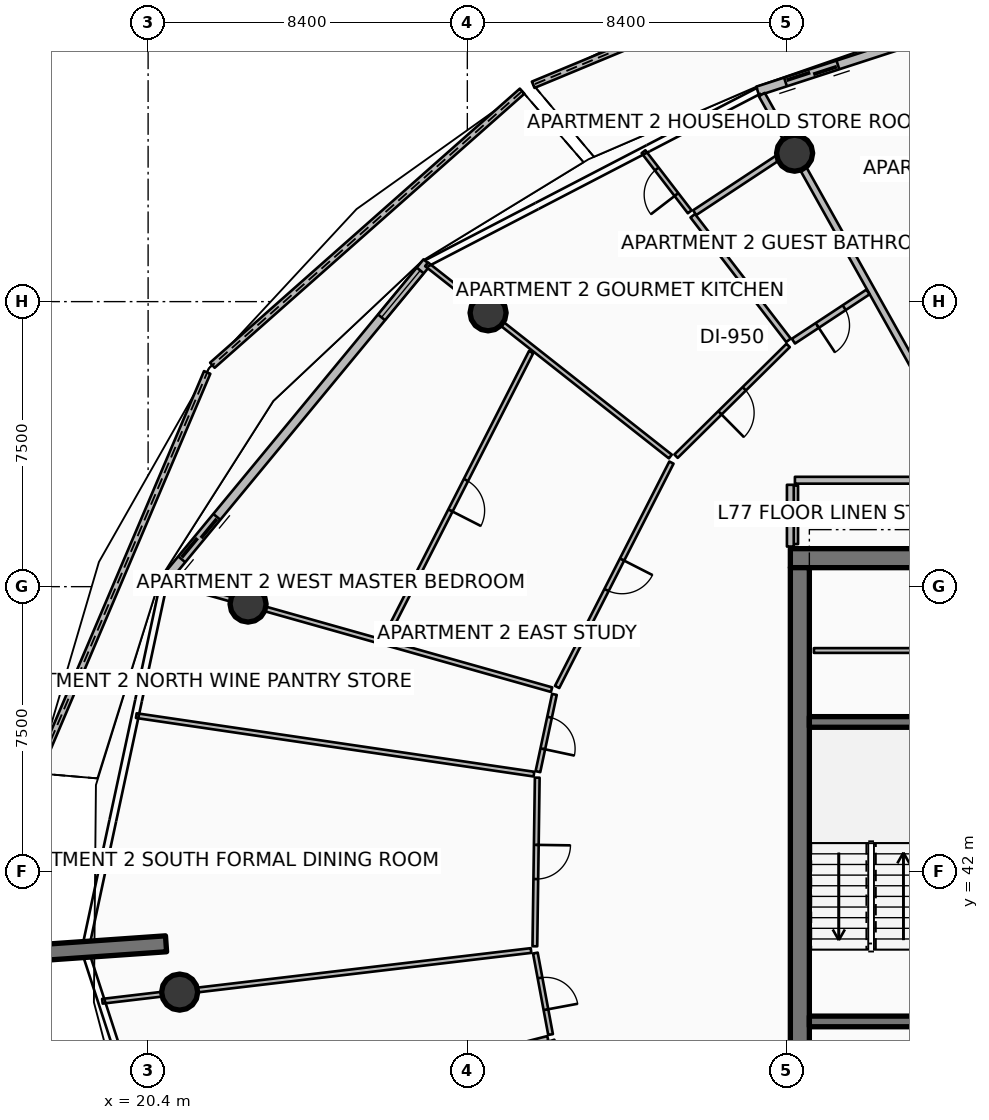
"""IFC4 building model, lengths in metres.
Left out: names, types, materials, properties, quantities, classifications, styles, units other than length and angle.
Written with IfcOpenShell. Run it as: python <this file> out.ifc"""

import sys

from ifc_helpers import new_model, si_unit, direction, frame, frame_2d, origin, origin_2d, place, context, subcontext, project, spatial, polyline, rectangle, circle, outline, extrude, element, fill, save


model = new_model("IFC4")
c1 = context("Model", 3, precision=1e-05, world=origin(), true_north=direction((0.0, 1.0)))
c2 = subcontext(c1, "Body", "Model", "MODEL_VIEW")
j1 = project(units=[si_unit("LENGTHUNIT", "METRE"), si_unit("PLANEANGLEUNIT", "RADIAN")], contexts=[c1])
p1 = place(None, origin())
s1 = spatial("IfcSite", under=j1, at=p1, CompositionType="ELEMENT")
p2 = place(p1, origin())
s2 = spatial("IfcBuilding", under=s1, at=p2, CompositionType="ELEMENT")
p3 = place(p2, frame((0.0, 0.0, 306.0)))
s3 = spatial("IfcBuildingStorey", under=s2, at=p3, CompositionType="ELEMENT", Elevation=306.0)
p4 = place(p3, frame((37.3, 50.25, 0.0), z_axis=(0.0, 0.0, 1.0), x_axis=(1.0, 0.0, 0.0)))
e1 = element("IfcWall", 1, at=p4, inside=s3, PredefinedType="SHEAR", context=c2, shape_type="SweptSolid", body=[
    extrude(rectangle(XDim=9.6, YDim=0.5, at=frame_2d((4.8, 0.0))), origin(), (0.0, 0.0, 1.0), 3.85),
])
p5 = place(p3, frame((37.55, 34.0, 0.0), z_axis=(0.0, 0.0, 1.0), x_axis=(0.0, 1.0, 0.0)))
e2 = element("IfcWall", 2, at=p5, inside=s3, PredefinedType="SHEAR", context=c2, shape_type="SweptSolid", body=[
    extrude(rectangle(XDim=16.0, YDim=0.5, at=frame_2d((8.0, 0.0))), origin(), (0.0, 0.0, 1.0), 3.85),
])
for number, where, z_axis, x_axis in (
    (3, (37.8, 38.06, 0.0), (0.0, 0.0, 1.0), (1.0, 0.0, 0.0)),
    (4, (37.8, 45.94, 0.0), (0.0, 0.0, 1.0), (1.0, 0.0, 0.0)),
):
    element("IfcWall", number, at=place(p3, frame(where, z_axis=z_axis, x_axis=x_axis)), inside=s3, PredefinedType="SHEAR", context=c2, shape_type="SweptSolid", body=[
        extrude(rectangle(XDim=3.5, YDim=0.28, at=frame_2d((1.75, 0.0))), origin(), (0.0, 0.0, 1.0), 3.85),
    ])
p6 = place(p3, frame((20.872, 40.103, 0.0), z_axis=(0.0, 0.0, 1.0), x_axis=(-0.997564163539, -0.069754853754, 0.0)))
e5 = element("IfcWall", 5, at=p6, inside=s3, PredefinedType="SOLIDWALL", context=c2, shape_type="SweptSolid", body=[
    extrude(rectangle(XDim=3.5, YDim=0.42, at=frame_2d((1.75, 0.0))), origin(), (0.0, 0.0, 1.0), 3.85),
])
p7 = place(p3, frame((37.412, 60.906, 0.0), z_axis=(0.142922715552, -0.25519013274, 0.956269362435), x_axis=(0.872482342855, 0.488645639913, 0.0)))
e6 = element("IfcColumn", 6, at=p7, inside=s3, PredefinedType="COLUMN", context=c2, shape_type="SweptSolid", body=[
    extrude(circle(Radius=0.475, at=origin_2d()), origin(), (0.0, 0.0, 1.0), 3.608),
])
p8 = place(p3, frame((29.346, 56.705, 0.0), z_axis=(0.249725028878, -0.196787616792, 0.948109721408), x_axis=(0.618939298338, 0.785438823189, 0.0)))
e7 = element("IfcColumn", 7, at=p8, inside=s3, PredefinedType="COLUMN", context=c2, shape_type="SweptSolid", body=[
    extrude(circle(Radius=0.475, at=origin_2d()), origin(), (0.0, 0.0, 1.0), 3.639),
])
p9 = place(p3, frame((23.03, 49.042, 0.0), z_axis=(0.330987533093, -0.093362273438, 0.939005185734), x_axis=(0.271478522348, 0.96244449809, 0.0)))
e8 = element("IfcColumn", 8, at=p9, inside=s3, PredefinedType="COLUMN", context=c2, shape_type="SweptSolid", body=[
    extrude(circle(Radius=0.475, at=origin_2d()), origin(), (0.0, 0.0, 1.0), 3.674),
])
p10 = place(p3, frame((21.23, 38.832, 0.0), z_axis=(0.353185583697, 0.041800241366, 0.934619004349), x_axis=(-0.117531776266, 0.993069122251, 0.0)))
e9 = element("IfcColumn", 9, at=p10, inside=s3, PredefinedType="COLUMN", context=c2, shape_type="SweptSolid", body=[
    extrude(circle(Radius=0.475, at=origin_2d()), origin(), (0.0, 0.0, 1.0), 3.691),
])
p11 = place(p3, frame((39.885, 66.589, 0.0), z_axis=(0.0, 0.0, 1.0), x_axis=(-0.923579743218, -0.383406387424, 0.0)))
e10 = element("IfcWall", 10, at=p11, inside=s3, PredefinedType="PARAPET", context=c2, shape_type="SweptSolid", body=[
    extrude(outline(polyline([(0.0, 0.0), (10.126, 0.0), (10.126, 1.756), (5.063, 1.853), (0.0, 1.832), (0.0, 0.0)])), frame((0.0, 0.09, 0.0), z_axis=(0.0, -1.0, 0.0), x_axis=(1.0, 0.0, 0.0)), (0.0, 0.0, 1.0), 0.18),
])
p12 = place(p3, frame((30.241, 62.537, 0.0), z_axis=(0.0, 0.0, 1.0), x_axis=(-0.748953310354, -0.662622772707, 0.0)))
e11 = element("IfcWall", 11, at=p12, inside=s3, PredefinedType="PARAPET", context=c2, shape_type="SweptSolid", body=[
    extrude(outline(polyline([(0.0, 0.0), (10.882, 0.0), (10.882, 1.348), (5.441, 1.562), (0.0, 1.747), (0.0, 0.0)])), frame((0.0, 0.09, 0.0), z_axis=(0.0, -1.0, 0.0), x_axis=(1.0, 0.0, 0.0)), (0.0, 0.0, 1.0), 0.18),
])
p13 = place(p3, frame((21.954, 55.137, 0.0), z_axis=(0.0, 0.0, 1.0), x_axis=(-0.391228155608, -0.920293719559, 0.0)))
e12 = element("IfcWall", 12, at=p13, inside=s3, PredefinedType="PARAPET", context=c2, shape_type="SweptSolid", body=[
    extrude(outline(polyline([(0.0, 0.0), (11.46, 0.0), (11.46, 1.12), (5.73, 1.182), (0.0, 1.348), (0.0, 0.0)])), frame((0.0, 0.09, 0.0), z_axis=(0.0, -1.0, 0.0), x_axis=(1.0, 0.0, 0.0)), (0.0, 0.0, 1.0), 0.18),
])
p14 = place(p3, frame((45.278, 65.414, 0.0), z_axis=(0.0, 0.0, 1.0), x_axis=(-0.951057039462, -0.309015384228, 0.0)))
e13 = element("IfcWall", 13, at=p14, inside=s3, PredefinedType="SOLIDWALL", context=c2, shape_type="SweptSolid", body=[
    extrude(rectangle(XDim=9.293, YDim=0.24, at=frame_2d((4.647, 0.0))), origin(), (0.0, 0.0, 1.0), 2.4),
])
p15 = place(p14, frame((7.073, 0.0, 0.0)))
e14 = element("IfcOpeningElement", 14, at=p15, cuts=e13, PredefinedType="OPENING", context=c2, shape_type="SweptSolid", body=[
    extrude(rectangle(XDim=1.45, YDim=2.15, at=frame_2d((0.725, 1.075))), frame((0.0, 0.13, 0.0), z_axis=(0.0, -1.0, 0.0), x_axis=(1.0, 0.0, 0.0)), (0.0, 0.0, 1.0), 0.26),
])
p16 = place(p14, frame((0.28, 0.0, 0.65)))
e15 = element("IfcOpeningElement", 15, at=p16, cuts=e13, PredefinedType="OPENING", context=c2, shape_type="SweptSolid", body=[
    extrude(rectangle(XDim=1.6, YDim=1.5, at=frame_2d((0.8, 0.75))), frame((0.0, 0.13, 0.0), z_axis=(0.0, -1.0, 0.0), x_axis=(1.0, 0.0, 0.0)), (0.0, 0.0, 1.0), 0.26),
])
p17 = place(p3, frame((27.74, 58.036, 0.0), z_axis=(0.0, 0.0, 1.0), x_axis=(-0.636725835274, -0.771090274024, 0.0)))
e16 = element("IfcWall", 16, at=p17, inside=s3, PredefinedType="SOLIDWALL", context=c2, shape_type="SweptSolid", body=[
    extrude(rectangle(XDim=10.907, YDim=0.24, at=frame_2d((5.454, 0.0))), origin(), (0.0, 0.0, 1.0), 2.4),
])
p18 = place(p17, frame((8.687, 0.0, 0.0)))
e17 = element("IfcOpeningElement", 17, at=p18, cuts=e16, PredefinedType="OPENING", context=c2, shape_type="SweptSolid", body=[
    extrude(rectangle(XDim=1.45, YDim=2.15, at=frame_2d((0.725, 1.075))), frame((0.0, 0.13, 0.0), z_axis=(0.0, -1.0, 0.0), x_axis=(1.0, 0.0, 0.0)), (0.0, 0.0, 1.0), 0.26),
])
p19 = place(p17, frame((0.28, 0.0, 0.65)))
e18 = element("IfcOpeningElement", 18, at=p19, cuts=e16, PredefinedType="OPENING", context=c2, shape_type="SweptSolid", body=[
    extrude(rectangle(XDim=1.6, YDim=1.5, at=frame_2d((0.8, 0.75))), frame((0.0, 0.13, 0.0), z_axis=(0.0, -1.0, 0.0), x_axis=(1.0, 0.0, 0.0)), (0.0, 0.0, 1.0), 0.26),
])
p20 = place(p3, frame((37.92, 47.82, 0.0), z_axis=(0.0, 0.0, 1.0), x_axis=(1.0, 0.0, 0.0)))
e19 = element("IfcWall", 19, at=p20, inside=s3, PredefinedType="PARTITIONING", context=c2, shape_type="SweptSolid", body=[
    extrude(rectangle(XDim=8.78, YDim=0.125, at=frame_2d((4.39, 0.0))), origin(), (0.0, 0.0, 1.0), 2.89),
])
p21 = place(p20, frame((3.965, 0.0, 0.0)))
e20 = element("IfcOpeningElement", 20, at=p21, cuts=e19, PredefinedType="OPENING", context=c2, shape_type="SweptSolid", body=[
    extrude(rectangle(XDim=0.85, YDim=2.06, at=frame_2d((0.425, 1.03))), frame((0.0, 0.073, 0.0), z_axis=(0.0, -1.0, 0.0), x_axis=(1.0, 0.0, 0.0)), (0.0, 0.0, 1.0), 0.145),
])
p22 = place(p3, frame((37.44, 50.62, 0.0), z_axis=(0.0, 0.0, 1.0), x_axis=(0.0, 1.0, 0.0)))
e21 = element("IfcWall", 21, at=p22, inside=s3, PredefinedType="PARTITIONING", context=c2, shape_type="SweptSolid", body=[
    extrude(rectangle(XDim=1.54, YDim=0.125, at=frame_2d((0.77, 0.0))), origin(), (0.0, 0.0, 1.0), 2.407),
])
p23 = place(p3, frame((42.178, 52.396, 0.0), z_axis=(0.0, 0.0, 1.0), x_axis=(-0.488621436647, 0.872495897783, 0.0)))
e22 = element("IfcWall", 22, at=p23, inside=s3, PredefinedType="PARTITIONING", context=c2, shape_type="SweptSolid", body=[
    extrude(rectangle(XDim=11.521, YDim=0.18, at=frame_2d((5.76, 0.0))), origin(), (0.0, 0.0, 1.0), 2.407),
])
p24 = place(p3, frame((42.112, 52.3, 0.0), z_axis=(0.0, 0.0, 1.0), x_axis=(-1.0, 0.0, 0.0)))
e23 = element("IfcWall", 23, at=p24, inside=s3, PredefinedType="PARTITIONING", context=c2, shape_type="SweptSolid", body=[
    extrude(rectangle(XDim=4.692, YDim=0.18, at=frame_2d((2.346, 0.0))), origin(), (0.0, 0.0, 1.0), 2.407),
])
p25 = place(p3, frame((37.3, 52.18, 0.0), z_axis=(0.0, 0.0, 1.0), x_axis=(0.0, -1.0, 0.0)))
e24 = element("IfcWall", 24, at=p25, inside=s3, PredefinedType="PARTITIONING", context=c2, shape_type="SweptSolid", body=[
    extrude(rectangle(XDim=1.625, YDim=0.18, at=frame_2d((0.812, 0.0))), origin(), (0.0, 0.0, 1.0), 2.407),
])
p26 = place(p3, frame((39.343, 57.254, 0.0), z_axis=(0.0, 0.0, 1.0), x_axis=(-0.834820417885, -0.550522360929, 0.0)))
e25 = element("IfcWall", 25, at=p26, inside=s3, PredefinedType="PARTITIONING", context=c2, shape_type="SweptSolid", body=[
    extrude(rectangle(XDim=2.35, YDim=0.15, at=frame_2d((1.175, 0.0))), origin(), (0.0, 0.0, 1.0), 2.407),
])
p27 = place(p26, frame((0.75, 0.0, 0.0)))
e26 = element("IfcOpeningElement", 26, at=p27, cuts=e25, PredefinedType="OPENING", context=c2, shape_type="SweptSolid", body=[
    extrude(rectangle(XDim=0.85, YDim=2.06, at=frame_2d((0.425, 1.03))), frame((0.0, 0.085, 0.0), z_axis=(0.0, -1.0, 0.0), x_axis=(1.0, 0.0, 0.0)), (0.0, 0.0, 1.0), 0.17),
])
p28 = place(p3, frame((37.26, 60.974, 0.0), z_axis=(0.0, 0.0, 1.0), x_axis=(-0.834824162433, -0.550516682598, 0.0)))
e27 = element("IfcWall", 27, at=p28, inside=s3, PredefinedType="PARTITIONING", context=c2, shape_type="SweptSolid", body=[
    extrude(rectangle(XDim=2.968, YDim=0.15, at=frame_2d((1.484, 0.0))), origin(), (0.0, 0.0, 1.0), 2.89),
])
p29 = place(p3, frame((37.251, 55.982, 0.0), z_axis=(0.0, 0.0, 1.0), x_axis=(-0.609453869873, 0.792821531303, 0.0)))
e28 = element("IfcWall", 28, at=p29, inside=s3, PredefinedType="PARTITIONING", context=c2, shape_type="SweptSolid", body=[
    extrude(rectangle(XDim=4.134, YDim=0.15, at=frame_2d((2.067, 0.0))), origin(), (0.0, 0.0, 1.0), 2.425),
])
p30 = place(p3, frame((34.652, 59.362, 0.0), z_axis=(0.0, 0.0, 1.0), x_axis=(-0.609450605146, 0.792824040937, 0.0)))
e29 = element("IfcWall", 29, at=p30, inside=s3, PredefinedType="PARTITIONING", context=c2, shape_type="SweptSolid", body=[
    extrude(rectangle(XDim=1.996, YDim=0.125, at=frame_2d((0.998, 0.0))), origin(), (0.0, 0.0, 1.0), 2.89),
])
p31 = place(p30, frame((0.573, 0.0, 0.0)))
e30 = element("IfcOpeningElement", 30, at=p31, cuts=e29, PredefinedType="OPENING", context=c2, shape_type="SweptSolid", body=[
    extrude(rectangle(XDim=0.85, YDim=2.06, at=frame_2d((0.425, 1.03))), frame((0.0, 0.073, 0.0), z_axis=(0.0, -1.0, 0.0), x_axis=(1.0, 0.0, 0.0)), (0.0, 0.0, 1.0), 0.145),
])
p32 = place(p3, frame((37.242, 55.847, 0.0), z_axis=(0.0, 0.0, 1.0), x_axis=(-0.711391624602, -0.702795814192, 0.0)))
e31 = element("IfcWall", 31, at=p32, inside=s3, PredefinedType="PARTITIONING", context=c2, shape_type="SweptSolid", body=[
    extrude(rectangle(XDim=4.147, YDim=0.125, at=frame_2d((2.073, 0.0))), origin(), (0.0, 0.0, 1.0), 2.407),
])
p33 = place(p32, frame((1.623, 0.0, 0.0)))
e32 = element("IfcOpeningElement", 32, at=p33, cuts=e31, PredefinedType="OPENING", context=c2, shape_type="SweptSolid", body=[
    extrude(rectangle(XDim=0.9, YDim=2.08, at=frame_2d((0.45, 1.04))), frame((0.0, 0.073, 0.0), z_axis=(0.0, -1.0, 0.0), x_axis=(1.0, 0.0, 0.0)), (0.0, 0.0, 1.0), 0.145),
])
p34 = place(p3, frame((34.142, 52.925, 0.0), z_axis=(0.0, 0.0, 1.0), x_axis=(-0.785321699218, 0.619087900655, 0.0)))
e33 = element("IfcWall", 33, at=p34, inside=s3, PredefinedType="PARTITIONING", context=c2, shape_type="SweptSolid", body=[
    extrude(rectangle(XDim=8.169, YDim=0.125, at=frame_2d((4.084, 0.0))), origin(), (0.0, 0.0, 1.0), 2.407),
])
p35 = place(p3, frame((34.171, 52.765, 0.0), z_axis=(0.0, 0.0, 1.0), x_axis=(-0.453994771894, -0.891004347404, 0.0)))
e34 = element("IfcWall", 34, at=p35, inside=s3, PredefinedType="PARTITIONING", context=c2, shape_type="SweptSolid", body=[
    extrude(rectangle(XDim=6.626, YDim=0.125, at=frame_2d((3.313, 0.0))), origin(), (0.0, 0.0, 1.0), 2.407),
])
p36 = place(p35, frame((2.863, 0.0, 0.0)))
e35 = element("IfcOpeningElement", 35, at=p36, cuts=e34, PredefinedType="OPENING", context=c2, shape_type="SweptSolid", body=[
    extrude(rectangle(XDim=0.9, YDim=2.08, at=frame_2d((0.45, 1.04))), frame((0.0, 0.073, 0.0), z_axis=(0.0, -1.0, 0.0), x_axis=(1.0, 0.0, 0.0)), (0.0, 0.0, 1.0), 0.145),
])
p37 = place(p3, frame((30.48, 55.674, 0.0), z_axis=(0.0, 0.0, 1.0), x_axis=(-0.453999703912, -0.891001834368, 0.0)))
e36 = element("IfcWall", 36, at=p37, inside=s3, PredefinedType="PARTITIONING", context=c2, shape_type="SweptSolid", body=[
    extrude(rectangle(XDim=8.46, YDim=0.125, at=frame_2d((4.23, 0.0))), origin(), (0.0, 0.0, 1.0), 2.407),
])
p38 = place(p37, frame((3.78, 0.0, 0.0)))
e37 = element("IfcOpeningElement", 37, at=p38, cuts=e36, PredefinedType="OPENING", context=c2, shape_type="SweptSolid", body=[
    extrude(rectangle(XDim=0.9, YDim=2.08, at=frame_2d((0.45, 1.04))), frame((0.0, 0.073, 0.0), z_axis=(0.0, -1.0, 0.0), x_axis=(1.0, 0.0, 0.0)), (0.0, 0.0, 1.0), 0.145),
])
p39 = place(p3, frame((31.017, 46.79, 0.0), z_axis=(0.0, 0.0, 1.0), x_axis=(-0.962454365365, 0.271443538495, 0.0)))
e38 = element("IfcWall", 38, at=p39, inside=s3, PredefinedType="PARTITIONING", context=c2, shape_type="SweptSolid", body=[
    extrude(rectangle(XDim=10.463, YDim=0.125, at=frame_2d((5.231, 0.0))), origin(), (0.0, 0.0, 1.0), 2.407),
])
p40 = place(p3, frame((30.552, 44.567, 0.0), z_axis=(0.0, 0.0, 1.0), x_axis=(-0.989347012597, 0.145576401471, 0.0)))
e39 = element("IfcWall", 39, at=p40, inside=s3, PredefinedType="PARTITIONING", context=c2, shape_type="SweptSolid", body=[
    extrude(rectangle(XDim=10.575, YDim=0.125, at=frame_2d((5.288, 0.0))), origin(), (0.0, 0.0, 1.0), 2.425),
])
p41 = place(p3, frame((31.092, 46.665, 0.0), z_axis=(0.0, 0.0, 1.0), x_axis=(-0.208863180958, -0.977944871473, 0.0)))
e40 = element("IfcWall", 40, at=p41, inside=s3, PredefinedType="PARTITIONING", context=c2, shape_type="SweptSolid", body=[
    extrude(rectangle(XDim=2.078, YDim=0.125, at=frame_2d((1.039, 0.0))), origin(), (0.0, 0.0, 1.0), 2.407),
])
p42 = place(p41, frame((0.614, 0.0, 0.0)))
e41 = element("IfcOpeningElement", 41, at=p42, cuts=e40, PredefinedType="OPENING", context=c2, shape_type="SweptSolid", body=[
    extrude(rectangle(XDim=0.85, YDim=2.06, at=frame_2d((0.425, 1.03))), frame((0.0, 0.073, 0.0), z_axis=(0.0, -1.0, 0.0), x_axis=(1.0, 0.0, 0.0)), (0.0, 0.0, 1.0), 0.145),
])
p43 = place(p3, frame((30.64, 44.474, 0.0), z_axis=(0.0, 0.0, 1.0), x_axis=(-0.014196236018, -0.999899228364, 0.0)))
e42 = element("IfcWall", 42, at=p43, inside=s3, PredefinedType="PARTITIONING", context=c2, shape_type="SweptSolid", body=[
    extrude(rectangle(XDim=4.437, YDim=0.125, at=frame_2d((2.219, 0.0))), origin(), (0.0, 0.0, 1.0), 2.407),
])
p44 = place(p43, frame((1.768, 0.0, 0.0)))
e43 = element("IfcOpeningElement", 43, at=p44, cuts=e42, PredefinedType="OPENING", context=c2, shape_type="SweptSolid", body=[
    extrude(rectangle(XDim=0.9, YDim=2.08, at=frame_2d((0.45, 1.04))), frame((0.0, 0.073, 0.0), z_axis=(0.0, -1.0, 0.0), x_axis=(1.0, 0.0, 0.0)), (0.0, 0.0, 1.0), 0.145),
])
p45 = place(p3, frame((30.476, 39.926, 0.0), z_axis=(0.0, 0.0, 1.0), x_axis=(-0.993068783977, -0.117534634433, 0.0)))
e44 = element("IfcWall", 44, at=p45, inside=s3, PredefinedType="PARTITIONING", context=c2, shape_type="SweptSolid", body=[
    extrude(rectangle(XDim=11.358, YDim=0.125, at=frame_2d((5.679, 0.0))), origin(), (0.0, 0.0, 1.0), 2.407),
])
p46 = place(p3, frame((30.918, 37.614, 0.0), z_axis=(0.0, 0.0, 1.0), x_axis=(-0.968583288046, -0.248689392855, 0.0)))
e45 = element("IfcWall", 45, at=p46, inside=s3, PredefinedType="PARTITIONING", context=c2, shape_type="SweptSolid", body=[
    extrude(rectangle(XDim=10.866, YDim=0.125, at=frame_2d((5.433, 0.0))), origin(), (0.0, 0.0, 1.0), 2.425),
])
p47 = place(p3, frame((30.59, 39.859, 0.0), z_axis=(0.0, 0.0, 1.0), x_axis=(0.183463941639, -0.983026440193, 0.0)))
e46 = element("IfcWall", 46, at=p47, inside=s3, PredefinedType="PARTITIONING", context=c2, shape_type="SweptSolid", body=[
    extrude(rectangle(XDim=2.181, YDim=0.125, at=frame_2d((1.091, 0.0))), origin(), (0.0, 0.0, 1.0), 2.407),
])
p48 = place(p47, frame((0.666, 0.0, 0.0)))
e47 = element("IfcOpeningElement", 47, at=p48, cuts=e46, PredefinedType="OPENING", context=c2, shape_type="SweptSolid", body=[
    extrude(rectangle(XDim=0.85, YDim=2.06, at=frame_2d((0.425, 1.03))), frame((0.0, 0.073, 0.0), z_axis=(0.0, -1.0, 0.0), x_axis=(1.0, 0.0, 0.0)), (0.0, 0.0, 1.0), 0.145),
])
p49 = place(p3, frame((31.03, 37.56, 0.0), z_axis=(0.0, 0.0, 1.0), x_axis=(0.309086072338, -0.951034068731, 0.0)))
e48 = element("IfcWall", 48, at=p49, inside=s3, PredefinedType="PARTITIONING", context=c2, shape_type="SweptSolid", body=[
    extrude(rectangle(XDim=2.043, YDim=0.125, at=frame_2d((1.022, 0.0))), origin(), (0.0, 0.0, 1.0), 2.89),
])
p50 = place(p49, frame((0.597, 0.0, 0.0)))
e49 = element("IfcOpeningElement", 49, at=p50, cuts=e48, PredefinedType="OPENING", context=c2, shape_type="SweptSolid", body=[
    extrude(rectangle(XDim=0.85, YDim=2.06, at=frame_2d((0.425, 1.03))), frame((0.0, 0.073, 0.0), z_axis=(0.0, -1.0, 0.0), x_axis=(1.0, 0.0, 0.0)), (0.0, 0.0, 1.0), 0.145),
])
p51 = place(p15, origin())
e50 = element("IfcDoor", 50, at=p51, inside=s3, OperationType="DOUBLE_DOOR_SLIDING", PredefinedType="DOOR", context=c2, shape_type="SweptSolid", body=[
    extrude(rectangle(XDim=1.45, YDim=2.15, at=frame_2d((0.725, 1.075))), frame((0.0, 0.025, 0.0), z_axis=(0.0, -1.0, 0.0), x_axis=(1.0, 0.0, 0.0)), (0.0, 0.0, 1.0), 0.05),
])
fill(e14, e50)
p52 = place(p18, origin())
e51 = element("IfcDoor", 51, at=p52, inside=s3, OperationType="DOUBLE_DOOR_SLIDING", PredefinedType="DOOR", context=c2, shape_type="SweptSolid", body=[
    extrude(rectangle(XDim=1.45, YDim=2.15, at=frame_2d((0.725, 1.075))), frame((0.0, 0.025, 0.0), z_axis=(0.0, -1.0, 0.0), x_axis=(1.0, 0.0, 0.0)), (0.0, 0.0, 1.0), 0.05),
])
fill(e17, e51)
p53 = place(p19, origin())
e52 = element("IfcWindow", 52, at=p53, inside=s3, PartitioningType="SINGLE_PANEL", PredefinedType="WINDOW", context=c2, shape_type="SweptSolid", body=[
    extrude(rectangle(XDim=1.6, YDim=1.5, at=frame_2d((0.8, 0.75))), frame((0.0, 0.03, 0.0), z_axis=(0.0, -1.0, 0.0), x_axis=(1.0, 0.0, 0.0)), (0.0, 0.0, 1.0), 0.06),
])
fill(e18, e52)
p54 = place(p27, origin())
e53 = element("IfcDoor", 53, at=p54, inside=s3, OperationType="SINGLE_SWING_RIGHT", PredefinedType="DOOR", context=c2, shape_type="SweptSolid", body=[
    extrude(rectangle(XDim=0.85, YDim=2.06, at=frame_2d((0.425, 1.03))), frame((0.0, 0.025, 0.0), z_axis=(0.0, -1.0, 0.0), x_axis=(1.0, 0.0, 0.0)), (0.0, 0.0, 1.0), 0.05),
])
fill(e26, e53)
p55 = place(p31, origin())
e54 = element("IfcDoor", 54, at=p55, inside=s3, OperationType="SINGLE_SWING_LEFT", PredefinedType="DOOR", context=c2, shape_type="SweptSolid", body=[
    extrude(rectangle(XDim=0.85, YDim=2.06, at=frame_2d((0.425, 1.03))), frame((0.0, 0.025, 0.0), z_axis=(0.0, -1.0, 0.0), x_axis=(1.0, 0.0, 0.0)), (0.0, 0.0, 1.0), 0.05),
])
fill(e30, e54)
p56 = place(p33, origin())
e55 = element("IfcDoor", 55, at=p56, inside=s3, OperationType="SINGLE_SWING_RIGHT", PredefinedType="DOOR", context=c2, shape_type="SweptSolid", body=[
    extrude(rectangle(XDim=0.9, YDim=2.08, at=frame_2d((0.45, 1.04))), frame((0.0, 0.025, 0.0), z_axis=(0.0, -1.0, 0.0), x_axis=(1.0, 0.0, 0.0)), (0.0, 0.0, 1.0), 0.05),
])
fill(e32, e55)
p57 = place(p36, origin())
e56 = element("IfcDoor", 56, at=p57, inside=s3, OperationType="SINGLE_SWING_LEFT", PredefinedType="DOOR", context=c2, shape_type="SweptSolid", body=[
    extrude(rectangle(XDim=0.9, YDim=2.08, at=frame_2d((0.45, 1.04))), frame((0.0, 0.025, 0.0), z_axis=(0.0, -1.0, 0.0), x_axis=(1.0, 0.0, 0.0)), (0.0, 0.0, 1.0), 0.05),
])
fill(e35, e56)
p58 = place(p38, origin())
e57 = element("IfcDoor", 57, at=p58, inside=s3, OperationType="SINGLE_SWING_RIGHT", PredefinedType="DOOR", context=c2, shape_type="SweptSolid", body=[
    extrude(rectangle(XDim=0.9, YDim=2.08, at=frame_2d((0.45, 1.04))), frame((0.0, 0.025, 0.0), z_axis=(0.0, -1.0, 0.0), x_axis=(1.0, 0.0, 0.0)), (0.0, 0.0, 1.0), 0.05),
])
fill(e37, e57)
p59 = place(p42, origin())
e58 = element("IfcDoor", 58, at=p59, inside=s3, OperationType="SINGLE_SWING_RIGHT", PredefinedType="DOOR", context=c2, shape_type="SweptSolid", body=[
    extrude(rectangle(XDim=0.85, YDim=2.06, at=frame_2d((0.425, 1.03))), frame((0.0, 0.025, 0.0), z_axis=(0.0, -1.0, 0.0), x_axis=(1.0, 0.0, 0.0)), (0.0, 0.0, 1.0), 0.05),
])
fill(e41, e58)
p60 = place(p44, origin())
e59 = element("IfcDoor", 59, at=p60, inside=s3, OperationType="SINGLE_SWING_LEFT", PredefinedType="DOOR", context=c2, shape_type="SweptSolid", body=[
    extrude(rectangle(XDim=0.9, YDim=2.08, at=frame_2d((0.45, 1.04))), frame((0.0, 0.025, 0.0), z_axis=(0.0, -1.0, 0.0), x_axis=(1.0, 0.0, 0.0)), (0.0, 0.0, 1.0), 0.05),
])
fill(e43, e59)
p61 = place(p48, origin())
e60 = element("IfcDoor", 60, at=p61, inside=s3, OperationType="SINGLE_SWING_RIGHT", PredefinedType="DOOR", context=c2, shape_type="SweptSolid", body=[
    extrude(rectangle(XDim=0.85, YDim=2.06, at=frame_2d((0.425, 1.03))), frame((0.0, 0.025, 0.0), z_axis=(0.0, -1.0, 0.0), x_axis=(1.0, 0.0, 0.0)), (0.0, 0.0, 1.0), 0.05),
])
fill(e47, e60)
save(model, sys.argv[1])
